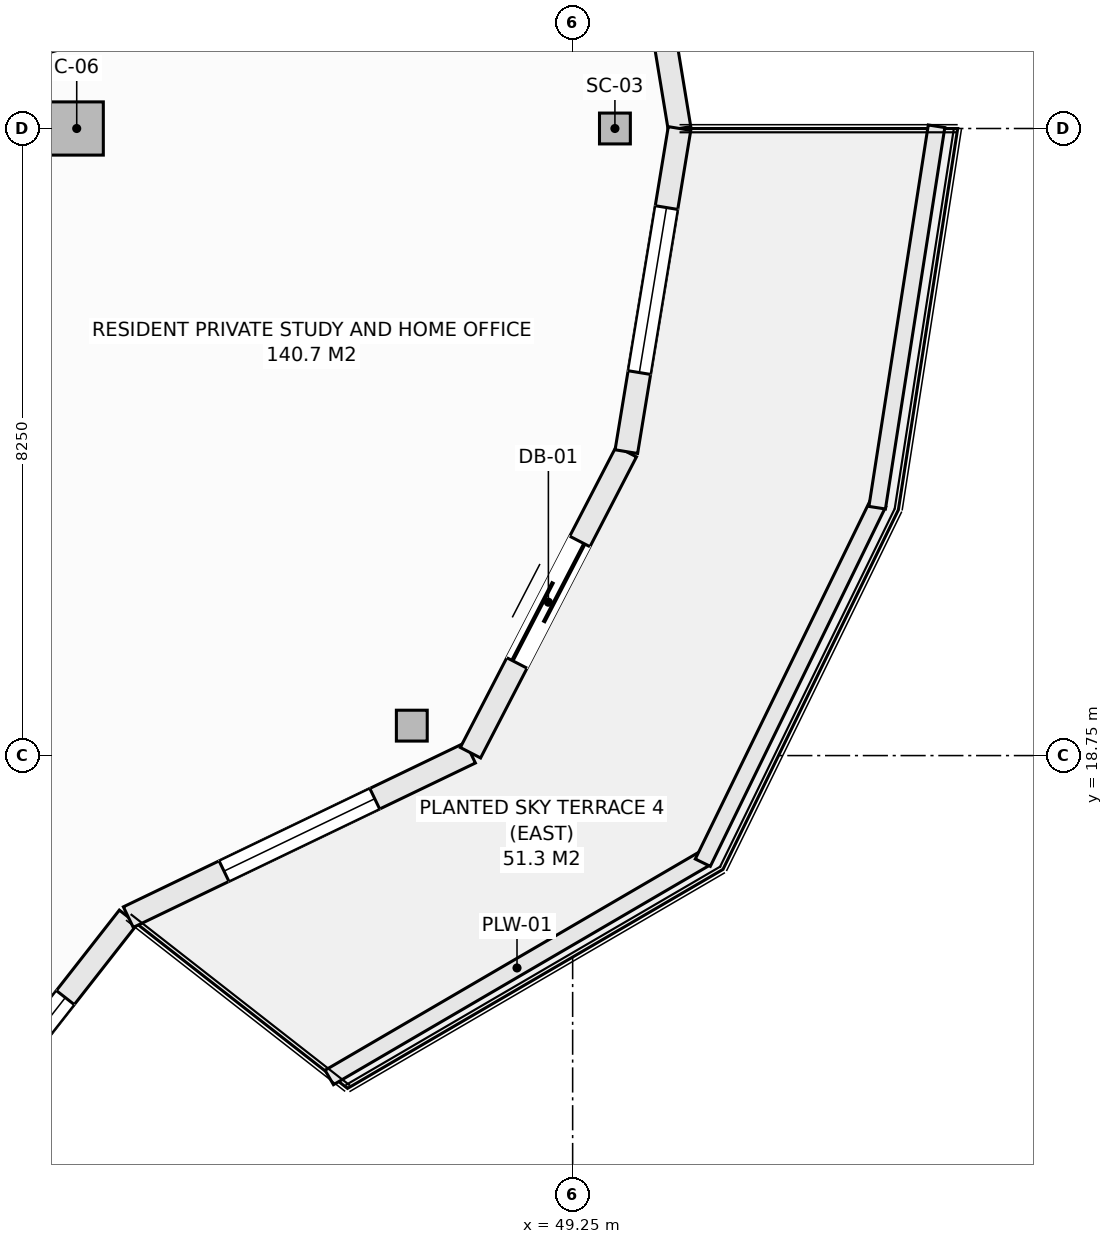
"""IFC4 building model, lengths in metres.
Left out: names, types, materials, properties, quantities, classifications, styles, units other than length and angle.
Written with IfcOpenShell. Run it as: python <this file> out.ifc"""

import sys

from ifc_helpers import new_model, si_unit, direction, frame, frame_2d, origin, origin_2d, place, context, subcontext, project, spatial, rectangle, hollow_rectangle, extrude, element, fill, save


model = new_model("IFC4")
c1 = context("Model", 3, precision=1e-05, world=origin(), true_north=direction((0.0, 1.0)))
c2 = subcontext(c1, "Body", "Model", "MODEL_VIEW")
j1 = project(units=[si_unit("LENGTHUNIT", "METRE"), si_unit("PLANEANGLEUNIT", "RADIAN")], contexts=[c1])
p1 = place(None, origin())
s1 = spatial("IfcSite", under=j1, at=p1, CompositionType="ELEMENT")
p2 = place(p1, origin())
s2 = spatial("IfcBuilding", under=s1, at=p2, CompositionType="ELEMENT")
p3 = place(p2, frame((0.0, 0.0, 269.0)))
s3 = spatial("IfcBuildingStorey", under=s2, at=p3, CompositionType="ELEMENT", Elevation=269.0)
for number, where, z_axis, x_axis in (
    (1, (49.806, 27.0, -0.27), (0.0, 0.0, 1.0), (1.0, 0.0, 0.0)),
    (2, (47.134, 19.144, -0.27), (0.0, 0.0, 1.0), (1.0, 0.0, 0.0)),
):
    element("IfcColumn", number, at=place(p3, frame(where, z_axis=z_axis, x_axis=x_axis)), inside=s3, PredefinedType="COLUMN", context=c2, shape_type="SweptSolid", body=[
        extrude(hollow_rectangle(XDim=0.406, YDim=0.406, WallThickness=0.016, at=origin_2d()), origin(), (0.0, 0.0, 1.0), 3.3),
    ])
p4 = place(p3, frame((42.725, 27.0, -0.27), z_axis=(0.0, 0.0, 1.0), x_axis=(1.0, 0.0, 0.0)))
e3 = element("IfcColumn", 3, at=p4, inside=s3, PredefinedType="COLUMN", context=c2, shape_type="SweptSolid", body=[
    extrude(rectangle(XDim=0.7, YDim=0.7, at=origin_2d()), origin(), (0.0, 0.0, 1.0), 3.3),
])
p5 = place(p3, frame((49.957, 31.251, 0.0), z_axis=(0.0, 0.0, 1.0), x_axis=(0.162404622434, -0.98672424649, 0.0)))
e4 = element("IfcWall", 4, at=p5, inside=s3, PredefinedType="SOLIDWALL", context=c2, shape_type="SweptSolid", body=[
    extrude(rectangle(XDim=4.308, YDim=0.3, at=frame_2d((2.154, 0.0))), origin(), (0.0, 0.0, 1.0), 2.605),
])
p6 = place(p5, frame((1.554, 0.0, 0.72)))
e5 = element("IfcOpeningElement", 5, at=p6, cuts=e4, PredefinedType="OPENING", context=c2, shape_type="SweptSolid", body=[
    extrude(rectangle(XDim=1.2, YDim=1.65, at=frame_2d((0.6, 0.825))), frame((0.0, 0.16, 0.0), z_axis=(0.0, -1.0, 0.0), x_axis=(1.0, 0.0, 0.0)), (0.0, 0.0, 1.0), 0.32),
])
p7 = place(p3, frame((40.391, 12.775, 0.0), z_axis=(0.0, 0.0, 1.0), x_axis=(0.616413297421, 0.78742278781, 0.0)))
e6 = element("IfcWall", 6, at=p7, inside=s3, PredefinedType="SOLIDWALL", context=c2, shape_type="SweptSolid", body=[
    extrude(rectangle(XDim=4.888, YDim=0.3, at=frame_2d((2.444, 0.0))), origin(), (0.0, 0.0, 1.0), 2.605),
])
p8 = place(p7, frame((1.344, 0.0, 0.72)))
e7 = element("IfcOpeningElement", 7, at=p8, cuts=e6, PredefinedType="OPENING", context=c2, shape_type="SweptSolid", body=[
    extrude(rectangle(XDim=2.2, YDim=1.65, at=frame_2d((1.1, 0.825))), frame((0.0, 0.16, 0.0), z_axis=(0.0, -1.0, 0.0), x_axis=(1.0, 0.0, 0.0)), (0.0, 0.0, 1.0), 0.32),
])
p9 = place(p3, frame((43.404, 16.625, 0.0), z_axis=(0.0, 0.0, 1.0), x_axis=(0.901346013132, 0.433099716706, 0.0)))
e8 = element("IfcWall", 8, at=p9, inside=s3, PredefinedType="SOLIDWALL", context=c2, shape_type="SweptSolid", body=[
    extrude(rectangle(XDim=4.994, YDim=0.3, at=frame_2d((2.497, 0.0))), origin(), (0.0, 0.0, 1.0), 2.605),
])
p10 = place(p9, frame((1.397, 0.0, 0.72)))
e9 = element("IfcOpeningElement", 9, at=p10, cuts=e8, PredefinedType="OPENING", context=c2, shape_type="SweptSolid", body=[
    extrude(rectangle(XDim=2.2, YDim=1.65, at=frame_2d((1.1, 0.825))), frame((0.0, 0.16, 0.0), z_axis=(0.0, -1.0, 0.0), x_axis=(1.0, 0.0, 0.0)), (0.0, 0.0, 1.0), 0.32),
])
p11 = place(p3, frame((47.906, 18.788, 0.0), z_axis=(0.0, 0.0, 1.0), x_axis=(0.459801070243, 0.888021945564, 0.0)))
e10 = element("IfcWall", 10, at=p11, inside=s3, PredefinedType="SOLIDWALL", context=c2, shape_type="SweptSolid", body=[
    extrude(rectangle(XDim=4.461, YDim=0.3, at=frame_2d((2.23, 0.0))), origin(), (0.0, 0.0, 1.0), 2.605),
])
p12 = place(p11, frame((1.33, 0.0, 0.0)))
e11 = element("IfcOpeningElement", 11, at=p12, cuts=e10, PredefinedType="OPENING", context=c2, shape_type="SweptSolid", body=[
    extrude(rectangle(XDim=1.8, YDim=2.25, at=frame_2d((0.9, 1.125))), frame((0.0, 0.16, 0.0), z_axis=(0.0, -1.0, 0.0), x_axis=(1.0, 0.0, 0.0)), (0.0, 0.0, 1.0), 0.32),
])
p13 = place(p3, frame((49.957, 22.749, 0.0), z_axis=(0.0, 0.0, 1.0), x_axis=(0.162404622434, 0.98672424649, 0.0)))
e12 = element("IfcWall", 12, at=p13, inside=s3, PredefinedType="SOLIDWALL", context=c2, shape_type="SweptSolid", body=[
    extrude(rectangle(XDim=4.308, YDim=0.3, at=frame_2d((2.154, 0.0))), origin(), (0.0, 0.0, 1.0), 2.605),
])
p14 = place(p13, frame((1.054, 0.0, 0.72)))
e13 = element("IfcOpeningElement", 13, at=p14, cuts=e12, PredefinedType="OPENING", context=c2, shape_type="SweptSolid", body=[
    extrude(rectangle(XDim=2.2, YDim=1.65, at=frame_2d((1.1, 0.825))), frame((0.0, 0.16, 0.0), z_axis=(0.0, -1.0, 0.0), x_axis=(1.0, 0.0, 0.0)), (0.0, 0.0, 1.0), 0.32),
])
p15 = place(p3, frame((46.048, 14.515, 0.0), z_axis=(0.0, 0.0, 1.0), x_axis=(0.863803671285, 0.503828559606, 0.0)))
e14 = element("IfcWall", 14, at=p15, inside=s3, PredefinedType="PARAPET", context=c2, shape_type="SweptSolid", body=[
    extrude(rectangle(XDim=5.719, YDim=0.22, at=frame_2d((2.86, 0.0))), origin(), (0.0, 0.0, 1.0), 0.52),
])
p16 = place(p3, frame((50.962, 17.341, 0.0), z_axis=(0.0, 0.0, 1.0), x_axis=(0.438469339137, 0.898746148051, 0.0)))
e15 = element("IfcWall", 15, at=p16, inside=s3, PredefinedType="PARAPET", context=c2, shape_type="SweptSolid", body=[
    extrude(rectangle(XDim=5.262, YDim=0.22, at=frame_2d((2.631, 0.0))), origin(), (0.0, 0.0, 1.0), 0.52),
])
p17 = place(p3, frame((53.257, 22.011, 0.0), z_axis=(0.0, 0.0, 1.0), x_axis=(0.15374038442, 0.988111276223, 0.0)))
e16 = element("IfcWall", 16, at=p17, inside=s3, PredefinedType="PARAPET", context=c2, shape_type="SweptSolid", body=[
    extrude(rectangle(XDim=5.078, YDim=0.22, at=frame_2d((2.539, 0.0))), origin(), (0.0, 0.0, 1.0), 0.52),
])
p18 = place(p3, frame((41.582, 27.838, 0.0), z_axis=(0.0, 0.0, 1.0), x_axis=(0.961811765236, 0.273711761262, 0.0)))
e17 = element("IfcWall", 17, at=p18, inside=s3, PredefinedType="PARTITIONING", context=c2, shape_type="SweptSolid", body=[
    extrude(rectangle(XDim=8.722, YDim=0.12, at=frame_2d((4.361, 0.0))), origin(), (0.0, 0.0, 1.0), 3.03),
])
p19 = place(p8, origin())
e18 = element("IfcWindow", 18, at=p19, inside=s3, PartitioningType="SINGLE_PANEL", PredefinedType="WINDOW", context=c2, shape_type="SweptSolid", body=[
    extrude(rectangle(XDim=2.2, YDim=1.65, at=frame_2d((1.1, 0.825))), frame((0.0, 0.03, 0.0), z_axis=(0.0, -1.0, 0.0), x_axis=(1.0, 0.0, 0.0)), (0.0, 0.0, 1.0), 0.06),
])
fill(e7, e18)
p20 = place(p10, origin())
e19 = element("IfcWindow", 19, at=p20, inside=s3, PartitioningType="SINGLE_PANEL", PredefinedType="WINDOW", context=c2, shape_type="SweptSolid", body=[
    extrude(rectangle(XDim=2.2, YDim=1.65, at=frame_2d((1.1, 0.825))), frame((0.0, 0.03, 0.0), z_axis=(0.0, -1.0, 0.0), x_axis=(1.0, 0.0, 0.0)), (0.0, 0.0, 1.0), 0.06),
])
fill(e9, e19)
p21 = place(p12, frame((1.8, 0.0, 0.0), z_axis=(0.0, 0.0, 1.0), x_axis=(-1.0, 0.0, 0.0)))
e20 = element("IfcDoor", 20, at=p21, inside=s3, OperationType="SLIDING_TO_LEFT", PredefinedType="DOOR", context=c2, shape_type="SweptSolid", body=[
    extrude(rectangle(XDim=1.8, YDim=2.25, at=frame_2d((0.9, 1.125))), frame((0.0, 0.025, 0.0), z_axis=(0.0, -1.0, 0.0), x_axis=(1.0, 0.0, 0.0)), (0.0, 0.0, 1.0), 0.05),
])
fill(e11, e20)
p22 = place(p14, origin())
e21 = element("IfcWindow", 21, at=p22, inside=s3, PartitioningType="SINGLE_PANEL", PredefinedType="WINDOW", context=c2, shape_type="SweptSolid", body=[
    extrude(rectangle(XDim=2.2, YDim=1.65, at=frame_2d((1.1, 0.825))), frame((0.0, 0.03, 0.0), z_axis=(0.0, -1.0, 0.0), x_axis=(1.0, 0.0, 0.0)), (0.0, 0.0, 1.0), 0.06),
])
fill(e13, e21)
save(model, sys.argv[1])
